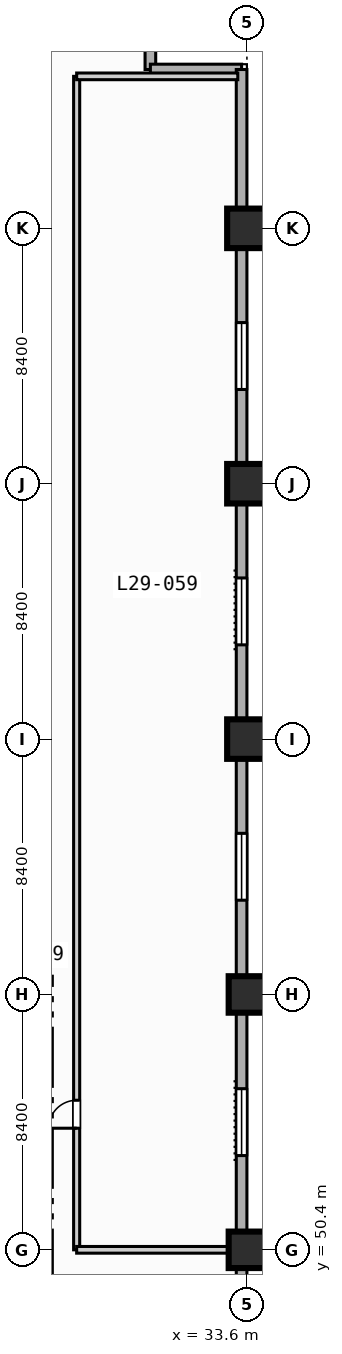
"""IFC4 building model, lengths in metres.
Left out: names, types, materials, properties, quantities, classifications, styles, units other than length and angle.
Written with IfcOpenShell. Run it as: python <this file> out.ifc"""

import sys

from ifc_helpers import new_model, si_unit, direction, frame, frame_2d, origin, origin_2d, place, context, subcontext, project, spatial, rectangle, extrude, element, fill, save


model = new_model("IFC4")
c1 = context("Model", 3, precision=1e-05, world=origin(), true_north=direction((0.0, 1.0)))
c2 = subcontext(c1, "Body", "Model", "MODEL_VIEW")
j1 = project(units=[si_unit("LENGTHUNIT", "METRE"), si_unit("PLANEANGLEUNIT", "RADIAN")], contexts=[c1])
p1 = place(None, origin())
s1 = spatial("IfcSite", under=j1, at=p1, CompositionType="ELEMENT")
p2 = place(p1, origin())
s2 = spatial("IfcBuilding", under=s1, at=p2, CompositionType="ELEMENT")
p3 = place(p2, frame((0.0, 0.0, 122.8)))
s3 = spatial("IfcBuildingStorey", under=s2, at=p3, CompositionType="ELEMENT", Elevation=122.8)
for number, where, z_axis, x_axis in (
    (1, (33.6, 50.4, 0.0), (0.0, 0.0, 1.0), (1.0, 0.0, 0.0)),
    (2, (33.6, 58.8, 0.0), (0.0, 0.0, 1.0), (1.0, 0.0, 0.0)),
):
    element("IfcColumn", number, at=place(p3, frame(where, z_axis=z_axis, x_axis=x_axis)), inside=s3, PredefinedType="COLUMN", context=c2, shape_type="SweptSolid", body=[
        extrude(rectangle(XDim=1.2, YDim=1.2, at=origin_2d()), origin(), (0.0, 0.0, 1.0), 3.8),
    ])
for number, where, z_axis, x_axis in (
    (3, (33.6, 67.2, 0.0), (0.0, 0.0, 1.0), (1.0, 0.0, 0.0)),
    (4, (33.6, 75.6, 0.0), (0.0, 0.0, 1.0), (1.0, 0.0, 0.0)),
    (5, (33.6, 84.0, 0.0), (0.0, 0.0, 1.0), (1.0, 0.0, 0.0)),
):
    element("IfcColumn", number, at=place(p3, frame(where, z_axis=z_axis, x_axis=x_axis)), inside=s3, PredefinedType="COLUMN", context=c2, shape_type="SweptSolid", body=[
        extrude(rectangle(XDim=1.3, YDim=1.3, at=origin_2d()), origin(), (0.0, 0.0, 1.0), 3.8),
    ])
for number, where, z_axis, x_axis in (
    (6, (30.425, 92.225, 0.0), (0.0, 0.0, 1.0), (0.0, -1.0, 0.0)),
    (7, (30.425, 89.225, 0.0), (0.0, 0.0, 1.0), (1.0, 0.0, 0.0)),
):
    element("IfcWall", number, at=place(p3, frame(where, z_axis=z_axis, x_axis=x_axis)), inside=s3, PredefinedType="STANDARD", context=c2, shape_type="SweptSolid", body=[
        extrude(rectangle(XDim=3.0, YDim=0.35, at=frame_2d((1.5, 0.0))), origin(), (0.0, 0.0, 1.0), 3.55),
    ])
p4 = place(p3, frame((33.425, 89.225, 0.0), z_axis=(0.0, 0.0, 1.0), x_axis=(0.0, -1.0, 0.0)))
e8 = element("IfcWall", 8, at=p4, inside=s3, PredefinedType="STANDARD", context=c2, shape_type="SweptSolid", body=[
    extrude(rectangle(XDim=55.8, YDim=0.35, at=frame_2d((27.9, 0.0))), origin(), (0.0, 0.0, 1.0), 3.55),
])
p5 = place(p4, frame((50.325, 0.0, 0.85)))
e9 = element("IfcOpeningElement", 9, at=p5, cuts=e8, PredefinedType="OPENING", context=c2, shape_type="SweptSolid", body=[
    extrude(rectangle(XDim=2.2, YDim=1.8, at=frame_2d((1.1, 0.9))), frame((0.0, 0.185, 0.0), z_axis=(0.0, -1.0, 0.0), x_axis=(1.0, 0.0, 0.0)), (0.0, 0.0, 1.0), 0.37),
])
p6 = place(p4, frame((33.525, 0.0, 0.85)))
e10 = element("IfcOpeningElement", 10, at=p6, cuts=e8, PredefinedType="OPENING", context=c2, shape_type="SweptSolid", body=[
    extrude(rectangle(XDim=2.2, YDim=1.8, at=frame_2d((1.1, 0.9))), frame((0.0, 0.185, 0.0), z_axis=(0.0, -1.0, 0.0), x_axis=(1.0, 0.0, 0.0)), (0.0, 0.0, 1.0), 0.37),
])
p7 = place(p4, frame((25.125, 0.0, 0.85)))
e11 = element("IfcOpeningElement", 11, at=p7, cuts=e8, PredefinedType="OPENING", context=c2, shape_type="SweptSolid", body=[
    extrude(rectangle(XDim=2.2, YDim=1.8, at=frame_2d((1.1, 0.9))), frame((0.0, 0.185, 0.0), z_axis=(0.0, -1.0, 0.0), x_axis=(1.0, 0.0, 0.0)), (0.0, 0.0, 1.0), 0.37),
])
p8 = place(p4, frame((16.725, 0.0, 0.85)))
e12 = element("IfcOpeningElement", 12, at=p8, cuts=e8, PredefinedType="OPENING", context=c2, shape_type="SweptSolid", body=[
    extrude(rectangle(XDim=2.2, YDim=1.8, at=frame_2d((1.1, 0.9))), frame((0.0, 0.185, 0.0), z_axis=(0.0, -1.0, 0.0), x_axis=(1.0, 0.0, 0.0)), (0.0, 0.0, 1.0), 0.37),
])
p9 = place(p4, frame((8.325, 0.0, 0.85)))
e13 = element("IfcOpeningElement", 13, at=p9, cuts=e8, PredefinedType="OPENING", context=c2, shape_type="SweptSolid", body=[
    extrude(rectangle(XDim=2.2, YDim=1.8, at=frame_2d((1.1, 0.9))), frame((0.0, 0.185, 0.0), z_axis=(0.0, -1.0, 0.0), x_axis=(1.0, 0.0, 0.0)), (0.0, 0.0, 1.0), 0.37),
])
p10 = place(p3, frame((28.0, 50.4, 0.0), z_axis=(0.0, 0.0, 1.0), x_axis=(0.0, 1.0, 0.0)))
e14 = element("IfcWall", 14, at=p10, inside=s3, PredefinedType="PARTITIONING", context=c2, shape_type="SweptSolid", body=[
    extrude(rectangle(XDim=38.6, YDim=0.2, at=frame_2d((19.3, 0.0))), origin(), (0.0, 0.0, 1.0), 3.55),
])
p11 = place(p10, frame((4.0, 0.0, 0.0)))
e15 = element("IfcOpeningElement", 15, at=p11, cuts=e14, PredefinedType="OPENING", context=c2, shape_type="SweptSolid", body=[
    extrude(rectangle(XDim=0.92, YDim=2.1, at=frame_2d((0.46, 1.05))), frame((0.0, 0.11, 0.0), z_axis=(0.0, -1.0, 0.0), x_axis=(1.0, 0.0, 0.0)), (0.0, 0.0, 1.0), 0.22),
])
p12 = place(p3, frame((28.0, 50.4, 0.0), z_axis=(0.0, 0.0, 1.0), x_axis=(1.0, 0.0, 0.0)))
e16 = element("IfcWall", 16, at=p12, inside=s3, PredefinedType="PARTITIONING", context=c2, shape_type="SweptSolid", body=[
    extrude(rectangle(XDim=5.3, YDim=0.22, at=frame_2d((2.65, 0.0))), origin(), (0.0, 0.0, 1.0), 2.8),
])
p13 = place(p3, frame((28.0, 89.0, 0.0), z_axis=(0.0, 0.0, 1.0), x_axis=(1.0, 0.0, 0.0)))
e17 = element("IfcWall", 17, at=p13, inside=s3, PredefinedType="PARTITIONING", context=c2, shape_type="SweptSolid", body=[
    extrude(rectangle(XDim=5.3, YDim=0.22, at=frame_2d((2.65, 0.0))), origin(), (0.0, 0.0, 1.0), 3.55),
])
p14 = place(p6, origin())
e18 = element("IfcWindow", 18, at=p14, inside=s3, PartitioningType="SINGLE_PANEL", PredefinedType="WINDOW", context=c2, shape_type="SweptSolid", body=[
    extrude(rectangle(XDim=2.2, YDim=1.8, at=frame_2d((1.1, 0.9))), frame((0.0, 0.03, 0.0), z_axis=(0.0, -1.0, 0.0), x_axis=(1.0, 0.0, 0.0)), (0.0, 0.0, 1.0), 0.06),
])
fill(e10, e18)
p15 = place(p7, origin())
e19 = element("IfcWindow", 19, at=p15, inside=s3, PartitioningType="SINGLE_PANEL", PredefinedType="WINDOW", context=c2, shape_type="SweptSolid", body=[
    extrude(rectangle(XDim=2.2, YDim=1.8, at=frame_2d((1.1, 0.9))), frame((0.0, 0.03, 0.0), z_axis=(0.0, -1.0, 0.0), x_axis=(1.0, 0.0, 0.0)), (0.0, 0.0, 1.0), 0.06),
])
fill(e11, e19)
p16 = place(p8, origin())
e20 = element("IfcWindow", 20, at=p16, inside=s3, PartitioningType="SINGLE_PANEL", PredefinedType="WINDOW", context=c2, shape_type="SweptSolid", body=[
    extrude(rectangle(XDim=2.2, YDim=1.8, at=frame_2d((1.1, 0.9))), frame((0.0, 0.03, 0.0), z_axis=(0.0, -1.0, 0.0), x_axis=(1.0, 0.0, 0.0)), (0.0, 0.0, 1.0), 0.06),
])
fill(e12, e20)
p17 = place(p9, origin())
e21 = element("IfcWindow", 21, at=p17, inside=s3, PartitioningType="SINGLE_PANEL", PredefinedType="WINDOW", context=c2, shape_type="SweptSolid", body=[
    extrude(rectangle(XDim=2.2, YDim=1.8, at=frame_2d((1.1, 0.9))), frame((0.0, 0.03, 0.0), z_axis=(0.0, -1.0, 0.0), x_axis=(1.0, 0.0, 0.0)), (0.0, 0.0, 1.0), 0.06),
])
fill(e13, e21)
p18 = place(p11, origin())
e22 = element("IfcDoor", 22, at=p18, inside=s3, OperationType="SINGLE_SWING_LEFT", PredefinedType="DOOR", context=c2, shape_type="SweptSolid", body=[
    extrude(rectangle(XDim=0.92, YDim=2.1, at=frame_2d((0.46, 1.05))), frame((0.0, 0.025, 0.0), z_axis=(0.0, -1.0, 0.0), x_axis=(1.0, 0.0, 0.0)), (0.0, 0.0, 1.0), 0.05),
])
fill(e15, e22)
save(model, sys.argv[1])
